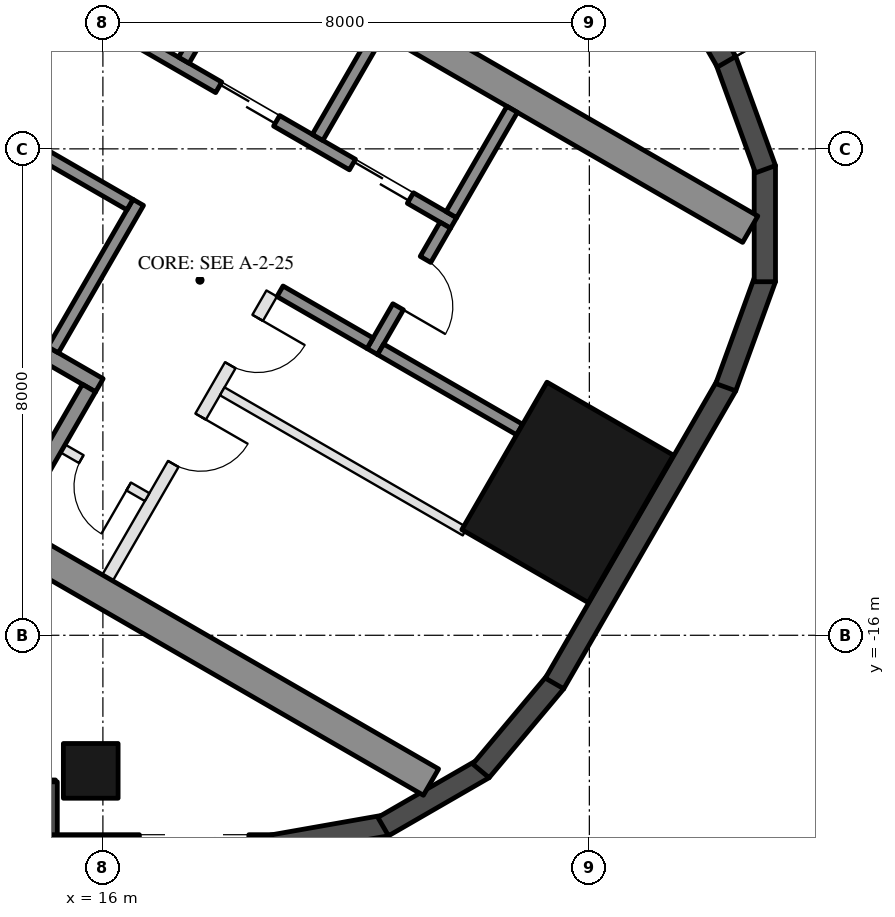
"""IFC4 building model, lengths in metres.
Left out: names, types, materials, properties, quantities, classifications, styles, units other than length and angle.
Written with IfcOpenShell. Run it as: python <this file> out.ifc"""

import sys

from ifc_helpers import new_model, si_unit, direction, frame, frame_2d, origin, origin_2d, place, context, subcontext, project, spatial, rectangle, hollow_rectangle, extrude, element, fill, save


model = new_model("IFC4")
c1 = context("Model", 3, precision=1e-05, world=origin(), true_north=direction((0.0, 1.0)))
c2 = subcontext(c1, "Body", "Model", "MODEL_VIEW")
j1 = project(units=[si_unit("LENGTHUNIT", "METRE"), si_unit("PLANEANGLEUNIT", "RADIAN")], contexts=[c1])
p1 = place(None, origin())
s1 = spatial("IfcSite", under=j1, at=p1, CompositionType="ELEMENT")
p2 = place(p1, origin())
s2 = spatial("IfcBuilding", under=s1, at=p2, CompositionType="ELEMENT")
p3 = place(p2, frame((0.0, 0.0, 113.1)))
s3 = spatial("IfcBuildingStorey", under=s2, at=p3, CompositionType="ELEMENT", Elevation=113.1)
p4 = place(p3, frame((15.8, -18.23, 0.0), z_axis=(0.0, 0.0, 1.0), x_axis=(-1.0, 0.0, 0.0)))
e1 = element("IfcColumn", 1, at=p4, inside=s3, PredefinedType="COLUMN", context=c2, shape_type="SweptSolid", body=[
    extrude(hollow_rectangle(XDim=0.9, YDim=0.9, WallThickness=0.04, at=origin_2d()), origin(), (0.0, 0.0, 1.0), 3.7),
])
p5 = place(p3, frame((23.643, -13.65, 0.0), z_axis=(0.0, 0.0, 1.0), x_axis=(0.5, 0.866025403784, 0.0)))
e2 = element("IfcColumn", 2, at=p5, inside=s3, PredefinedType="COLUMN", context=c2, shape_type="SweptSolid", body=[
    extrude(hollow_rectangle(XDim=2.8, YDim=2.4, WallThickness=0.07, at=origin_2d()), origin(), (0.0, 0.0, 1.0), 3.7),
])
p6 = place(p3, frame((8.48, -18.555, 0.0), z_axis=(0.0, 0.0, 1.0), x_axis=(1.0, 0.0, 0.0)))
e3 = element("IfcWall", 3, at=p6, inside=s3, PredefinedType="SOLIDWALL", context=c2, shape_type="SweptSolid", body=[
    extrude(rectangle(XDim=6.74, YDim=0.35, at=frame_2d((3.37, 0.0))), origin(), (0.0, 0.0, 1.0), 3.55),
])
p7 = place(p6, frame((0.32, 0.0, 0.0)))
e4 = element("IfcOpeningElement", 4, at=p7, cuts=e3, PredefinedType="OPENING", context=c2, shape_type="SweptSolid", body=[
    extrude(rectangle(XDim=2.4, YDim=2.4, at=frame_2d((1.2, 1.2))), frame((0.0, 0.185, 0.0), z_axis=(0.0, -1.0, 0.0), x_axis=(1.0, 0.0, 0.0)), (0.0, 0.0, 1.0), 0.37),
])
p8 = place(p6, frame((3.02, 0.0, 0.3)))
e5 = element("IfcOpeningElement", 5, at=p8, cuts=e3, PredefinedType="OPENING", context=c2, shape_type="SweptSolid", body=[
    extrude(rectangle(XDim=2.9, YDim=2.65, at=frame_2d((1.45, 1.325))), frame((0.0, 0.185, 0.0), z_axis=(0.0, -1.0, 0.0), x_axis=(1.0, 0.0, 0.0)), (0.0, 0.0, 1.0), 0.37),
])
p9 = place(p3, frame((15.075, -18.41, 0.0), z_axis=(0.0, 0.0, 1.0), x_axis=(0.0, -1.0, 0.0)))
e6 = element("IfcWall", 6, at=p9, inside=s3, PredefinedType="SOLIDWALL", context=c2, shape_type="SweptSolid", body=[
    extrude(rectangle(XDim=1.22, YDim=0.35, at=frame_2d((0.61, 0.0))), origin(), (0.0, 0.0, 1.0), 3.55),
])
p10 = place(p3, frame((14.9, -19.455, 0.0), z_axis=(0.0, 0.0, 1.0), x_axis=(1.0, 0.0, 0.0)))
e7 = element("IfcWall", 7, at=p10, inside=s3, PredefinedType="SOLIDWALL", context=c2, shape_type="SweptSolid", body=[
    extrude(rectangle(XDim=3.916, YDim=0.35, at=frame_2d((1.958, 0.0))), origin(), (0.0, 0.0, 1.0), 3.55),
])
p11 = place(p10, frame((1.7, 0.0, 0.3)))
e8 = element("IfcOpeningElement", 8, at=p11, cuts=e7, PredefinedType="OPENING", context=c2, shape_type="SweptSolid", body=[
    extrude(rectangle(XDim=1.8, YDim=2.65, at=frame_2d((0.9, 1.325))), frame((0.0, 0.185, 0.0), z_axis=(0.0, -1.0, 0.0), x_axis=(1.0, 0.0, 0.0)), (0.0, 0.0, 1.0), 0.37),
])
p12 = place(p3, frame((18.785, -19.458, 0.0), z_axis=(0.0, 0.0, 1.0), x_axis=(0.984798995425, 0.173697837091, 0.0)))
e9 = element("IfcWall", 9, at=p12, inside=s3, PredefinedType="SOLIDWALL", context=c2, shape_type="SweptSolid", body=[
    extrude(rectangle(XDim=1.91, YDim=0.35, at=frame_2d((0.955, 0.0))), origin(), (0.0, 0.0, 1.0), 3.55),
])
for number, where, z_axis, x_axis in (
    (10, (20.61, -19.147, 0.0), (0.0, 0.0, 1.0), (0.866, 0.5, 0.0)),
    (11, (22.217, -18.231, 0.0), (0.0, 0.0, 1.0), (0.643, 0.766, 0.0)),
):
    element("IfcWall", number, at=place(p3, frame(where, z_axis=z_axis, x_axis=x_axis)), inside=s3, PredefinedType="SOLIDWALL", context=c2, shape_type="SweptSolid", body=[
        extrude(rectangle(XDim=1.91, YDim=0.35, at=frame_2d((0.955, 0.0))), origin(), (0.0, 0.0, 1.0), 3.55),
    ])
p13 = place(p3, frame((23.427, -16.792, 0.0), z_axis=(0.0, 0.0, 1.0), x_axis=(0.500018773155, 0.866014564827, 0.0)))
e12 = element("IfcWall", 12, at=p13, inside=s3, PredefinedType="SOLIDWALL", context=c2, shape_type="SweptSolid", body=[
    extrude(rectangle(XDim=5.658, YDim=0.35, at=frame_2d((2.829, 0.0))), origin(), (0.0, 0.0, 1.0), 3.55),
])
for number, where, z_axis, x_axis in (
    (13, (26.244, -11.92, 0.0), (0.0, 0.0, 1.0), (0.342, 0.94, 0.0)),
    (14, (26.886, -10.185, 0.0), (0.0, 0.0, 1.0), (0.0, 1.0, 0.0)),
    (15, (26.897, -8.335, 0.0), (0.0, 0.0, 1.0), (-0.342, 0.94, 0.0)),
):
    element("IfcWall", number, at=place(p3, frame(where, z_axis=z_axis, x_axis=x_axis)), inside=s3, PredefinedType="SOLIDWALL", context=c2, shape_type="SweptSolid", body=[
        extrude(rectangle(XDim=1.91, YDim=0.35, at=frame_2d((0.955, 0.0))), origin(), (0.0, 0.0, 1.0), 3.55),
    ])
p14 = place(p3, frame((26.257, -6.567, 0.0), z_axis=(0.0, 0.0, 1.0), x_axis=(-0.500023526245, 0.866011820475, 0.0)))
e16 = element("IfcWall", 16, at=p14, inside=s3, PredefinedType="SOLIDWALL", context=c2, shape_type="SweptSolid", body=[
    extrude(rectangle(XDim=11.816, YDim=0.35, at=frame_2d((5.908, 0.0))), origin(), (0.0, 0.0, 1.0), 3.55),
])
p15 = place(p14, frame((0.38, 0.0, 0.3)))
e17 = element("IfcOpeningElement", 17, at=p15, cuts=e16, PredefinedType="OPENING", context=c2, shape_type="SweptSolid", body=[
    extrude(rectangle(XDim=1.8, YDim=2.65, at=frame_2d((0.9, 1.325))), frame((0.0, 0.185, 0.0), z_axis=(0.0, -1.0, 0.0), x_axis=(1.0, 0.0, 0.0)), (0.0, 0.0, 1.0), 0.37),
])
p16 = place(p14, frame((7.716, 0.0, 0.0)))
e18 = element("IfcOpeningElement", 18, at=p16, cuts=e16, PredefinedType="OPENING", context=c2, shape_type="SweptSolid", body=[
    extrude(rectangle(XDim=2.4, YDim=2.4, at=frame_2d((1.2, 1.2))), frame((0.0, 0.185, 0.0), z_axis=(0.0, -1.0, 0.0), x_axis=(1.0, 0.0, 0.0)), (0.0, 0.0, 1.0), 0.37),
])
p17 = place(p14, frame((3.816, 0.0, 0.3)))
e19 = element("IfcOpeningElement", 19, at=p17, cuts=e16, PredefinedType="OPENING", context=c2, shape_type="SweptSolid", body=[
    extrude(rectangle(XDim=1.6, YDim=2.65, at=frame_2d((0.8, 1.325))), frame((0.0, 0.185, 0.0), z_axis=(0.0, -1.0, 0.0), x_axis=(1.0, 0.0, 0.0)), (0.0, 0.0, 1.0), 0.37),
])
p18 = place(p14, frame((5.716, 0.0, 0.3)))
e20 = element("IfcOpeningElement", 20, at=p18, cuts=e16, PredefinedType="OPENING", context=c2, shape_type="SweptSolid", body=[
    extrude(rectangle(XDim=1.6, YDim=2.65, at=frame_2d((0.8, 1.325))), frame((0.0, 0.185, 0.0), z_axis=(0.0, -1.0, 0.0), x_axis=(1.0, 0.0, 0.0)), (0.0, 0.0, 1.0), 0.37),
])
for number, where, z_axis, x_axis in (
    (21, (8.547, -10.997, 0.0), (0.0, 0.0, 1.0), (0.866, -0.5, 0.0)),
    (22, (13.797, -1.903, 0.0), (0.0, 0.0, 1.0), (0.866, -0.5, 0.0)),
):
    element("IfcWall", number, at=place(p3, frame(where, z_axis=z_axis, x_axis=x_axis)), inside=s3, PredefinedType="SHEAR", context=c2, shape_type="SweptSolid", body=[
        extrude(rectangle(XDim=14.837, YDim=0.5, at=frame_2d((7.418, 0.0))), origin(), (0.0, 0.0, 1.0), 3.5),
    ])
p19 = place(p3, frame((10.356, -8.664, 0.0), z_axis=(0.0, 0.0, 1.0), x_axis=(0.866028629588, -0.499994412703, 0.0)))
e23 = element("IfcWall", 23, at=p19, inside=s3, PredefinedType="SHEAR", context=c2, shape_type="SweptSolid", body=[
    extrude(rectangle(XDim=6.45, YDim=0.25, at=frame_2d((3.225, 0.0))), origin(), (0.0, 0.0, 1.0), 3.5),
])
p20 = place(p19, frame((0.3, 0.0, 0.0)))
e24 = element("IfcOpeningElement", 24, at=p20, cuts=e23, PredefinedType="OPENING", context=c2, shape_type="SweptSolid", body=[
    extrude(rectangle(XDim=1.0, YDim=2.1, at=frame_2d((0.5, 1.05))), frame((0.0, 0.135, 0.0), z_axis=(0.0, -1.0, 0.0), x_axis=(1.0, 0.0, 0.0)), (0.0, 0.0, 1.0), 0.27),
])
p21 = place(p3, frame((14.496, -14.143, 0.0), z_axis=(0.0, 0.0, 1.0), x_axis=(0.500062241894, 0.865989465428, 0.0)))
e25 = element("IfcWall", 25, at=p21, inside=s3, PredefinedType="SHEAR", context=c2, shape_type="SweptSolid", body=[
    extrude(rectangle(XDim=2.55, YDim=0.25, at=frame_2d((1.275, 0.0))), origin(), (0.0, 0.0, 1.0), 3.5),
])
p22 = place(p3, frame((15.181, -11.305, 0.0), z_axis=(0.0, 0.0, 1.0), x_axis=(0.49994636267, 0.866056369097, 0.0)))
e26 = element("IfcWall", 26, at=p22, inside=s3, PredefinedType="SHEAR", context=c2, shape_type="SweptSolid", body=[
    extrude(rectangle(XDim=2.8, YDim=0.2, at=frame_2d((1.4, 0.0))), origin(), (0.0, 0.0, 1.0), 3.5),
])
p23 = place(p3, frame((14.02, -7.517, 0.0), z_axis=(0.0, 0.0, 1.0), x_axis=(0.866034573852, -0.49998411664, 0.0)))
e27 = element("IfcWall", 27, at=p23, inside=s3, PredefinedType="SHEAR", context=c2, shape_type="SweptSolid", body=[
    extrude(rectangle(XDim=2.8, YDim=0.2, at=frame_2d((1.4, 0.0))), origin(), (0.0, 0.0, 1.0), 3.5),
])
p24 = place(p3, frame((12.968, -4.138, 0.0), z_axis=(0.0, 0.0, 1.0), x_axis=(0.866028328073, -0.49999493495, 0.0)))
e28 = element("IfcWall", 28, at=p24, inside=s3, PredefinedType="SHEAR", context=c2, shape_type="SweptSolid", body=[
    extrude(rectangle(XDim=10.16, YDim=0.2, at=frame_2d((5.08, 0.0))), origin(), (0.0, 0.0, 1.0), 3.5),
])
p25 = place(p24, frame((0.62, 0.0, 0.0)))
e29 = element("IfcOpeningElement", 29, at=p25, cuts=e28, PredefinedType="OPENING", context=c2, shape_type="SweptSolid", body=[
    extrude(rectangle(XDim=1.1, YDim=2.1, at=frame_2d((0.55, 1.05))), frame((0.0, 0.11, 0.0), z_axis=(0.0, -1.0, 0.0), x_axis=(1.0, 0.0, 0.0)), (0.0, 0.0, 1.0), 0.22),
])
p26 = place(p24, frame((3.16, 0.0, 0.0)))
e30 = element("IfcOpeningElement", 30, at=p26, cuts=e28, PredefinedType="OPENING", context=c2, shape_type="SweptSolid", body=[
    extrude(rectangle(XDim=1.1, YDim=2.1, at=frame_2d((0.55, 1.05))), frame((0.0, 0.11, 0.0), z_axis=(0.0, -1.0, 0.0), x_axis=(1.0, 0.0, 0.0)), (0.0, 0.0, 1.0), 0.22),
])
p27 = place(p24, frame((5.7, 0.0, 0.0)))
e31 = element("IfcOpeningElement", 31, at=p27, cuts=e28, PredefinedType="OPENING", context=c2, shape_type="SweptSolid", body=[
    extrude(rectangle(XDim=1.1, YDim=2.1, at=frame_2d((0.55, 1.05))), frame((0.0, 0.11, 0.0), z_axis=(0.0, -1.0, 0.0), x_axis=(1.0, 0.0, 0.0)), (0.0, 0.0, 1.0), 0.22),
])
p28 = place(p24, frame((8.24, 0.0, 0.0)))
e32 = element("IfcOpeningElement", 32, at=p28, cuts=e28, PredefinedType="OPENING", context=c2, shape_type="SweptSolid", body=[
    extrude(rectangle(XDim=1.1, YDim=2.1, at=frame_2d((0.55, 1.05))), frame((0.0, 0.11, 0.0), z_axis=(0.0, -1.0, 0.0), x_axis=(1.0, 0.0, 0.0)), (0.0, 0.0, 1.0), 0.22),
])
p29 = place(p3, frame((20.43, -11.333, 0.0), z_axis=(0.0, 0.0, 1.0), x_axis=(0.500001309137, 0.866024647952, 0.0)))
e33 = element("IfcWall", 33, at=p29, inside=s3, PredefinedType="SHEAR", context=c2, shape_type="SweptSolid", body=[
    extrude(rectangle(XDim=2.4, YDim=0.2, at=frame_2d((1.2, 0.0))), origin(), (0.0, 0.0, 1.0), 3.5),
])
p30 = place(p29, frame((0.85, 0.0, 0.0)))
e34 = element("IfcOpeningElement", 34, at=p30, cuts=e33, PredefinedType="OPENING", context=c2, shape_type="SweptSolid", body=[
    extrude(rectangle(XDim=0.9, YDim=2.1, at=frame_2d((0.45, 1.05))), frame((0.0, 0.11, 0.0), z_axis=(0.0, -1.0, 0.0), x_axis=(1.0, 0.0, 0.0)), (0.0, 0.0, 1.0), 0.22),
])
p31 = place(p3, frame((18.913, -10.342, 0.0), z_axis=(0.0, 0.0, 1.0), x_axis=(0.866038183914, -0.499977863513, 0.0)))
e35 = element("IfcWall", 35, at=p31, inside=s3, PredefinedType="SHEAR", context=c2, shape_type="SweptSolid", body=[
    extrude(rectangle(XDim=1.71, YDim=0.2, at=frame_2d((0.855, 0.0))), origin(), (0.0, 0.0, 1.0), 3.5),
])
for number, where, z_axis, x_axis in (
    (36, (17.331, -6.542, 0.0), (0.0, 0.0, 1.0), (0.5, 0.866, 0.0)),
    (37, (19.531, -7.812, 0.0), (0.0, 0.0, 1.0), (0.5, 0.866, 0.0)),
    (38, (21.73, -9.082, 0.0), (0.0, 0.0, 1.0), (0.5, 0.866, 0.0)),
):
    element("IfcWall", number, at=place(p3, frame(where, z_axis=z_axis, x_axis=x_axis)), inside=s3, PredefinedType="SHEAR", context=c2, shape_type="SweptSolid", body=[
        extrude(rectangle(XDim=2.0, YDim=0.2, at=frame_2d((1.0, 0.0))), origin(), (0.0, 0.0, 1.0), 3.5),
    ])
p32 = place(p3, frame((20.567, -11.297, 0.0), z_axis=(0.0, 0.0, 1.0), x_axis=(0.866060851709, -0.499938597367, 0.0)))
e39 = element("IfcWall", 39, at=p32, inside=s3, PredefinedType="SHEAR", context=c2, shape_type="SweptSolid", body=[
    extrude(rectangle(XDim=2.64, YDim=0.2, at=frame_2d((1.32, 0.0))), origin(), (0.0, 0.0, 1.0), 3.5),
])
p33 = place(p3, frame((16.076, -15.055, 0.0), z_axis=(0.0, 0.0, 1.0), x_axis=(0.499995103361, 0.866028230842, 0.0)))
e40 = element("IfcWall", 40, at=p33, inside=s3, PredefinedType="PARTITIONING", context=c2, shape_type="SweptSolid", body=[
    extrude(rectangle(XDim=5.4, YDim=0.2, at=frame_2d((2.7, 0.0))), origin(), (0.0, 0.0, 1.0), 3.5),
])
p34 = place(p33, frame((2.163, 0.0, 0.0)))
e41 = element("IfcOpeningElement", 41, at=p34, cuts=e40, PredefinedType="OPENING", context=c2, shape_type="SweptSolid", body=[
    extrude(rectangle(XDim=0.9, YDim=2.1, at=frame_2d((0.45, 1.05))), frame((0.0, 0.11, 0.0), z_axis=(0.0, -1.0, 0.0), x_axis=(1.0, 0.0, 0.0)), (0.0, 0.0, 1.0), 0.22),
])
p35 = place(p33, frame((4.038, 0.0, 0.0)))
e42 = element("IfcOpeningElement", 42, at=p35, cuts=e40, PredefinedType="OPENING", context=c2, shape_type="SweptSolid", body=[
    extrude(rectangle(XDim=0.9, YDim=2.1, at=frame_2d((0.45, 1.05))), frame((0.0, 0.11, 0.0), z_axis=(0.0, -1.0, 0.0), x_axis=(1.0, 0.0, 0.0)), (0.0, 0.0, 1.0), 0.22),
])
p36 = place(p3, frame((15.342, -12.928, 0.0), z_axis=(0.0, 0.0, 1.0), x_axis=(0.865989903783, -0.500061482766, 0.0)))
e43 = element("IfcWall", 43, at=p36, inside=s3, PredefinedType="PARTITIONING", context=c2, shape_type="SweptSolid", body=[
    extrude(rectangle(XDim=1.6, YDim=0.15, at=frame_2d((0.8, 0.0))), origin(), (0.0, 0.0, 1.0), 3.5),
])
p37 = place(p36, frame((0.35, 0.0, 0.0)))
e44 = element("IfcOpeningElement", 44, at=p37, cuts=e43, PredefinedType="OPENING", context=c2, shape_type="SweptSolid", body=[
    extrude(rectangle(XDim=0.9, YDim=2.1, at=frame_2d((0.45, 1.05))), frame((0.0, 0.085, 0.0), z_axis=(0.0, -1.0, 0.0), x_axis=(1.0, 0.0, 0.0)), (0.0, 0.0, 1.0), 0.17),
])
p38 = place(p3, frame((17.963, -11.987, 0.0), z_axis=(0.0, 0.0, 1.0), x_axis=(0.865998608524, -0.500046407882, 0.0)))
e45 = element("IfcWall", 45, at=p38, inside=s3, PredefinedType="PARTITIONING", context=c2, shape_type="SweptSolid", body=[
    extrude(rectangle(XDim=4.61, YDim=0.15, at=frame_2d((2.305, 0.0))), origin(), (0.0, 0.0, 1.0), 3.5),
])
p39 = place(p37, frame((0.9, 0.0, 0.0), z_axis=(0.0, 0.0, 1.0), x_axis=(-1.0, 0.0, 0.0)))
e46 = element("IfcDoor", 46, at=p39, inside=s3, OperationType="SINGLE_SWING_LEFT", PredefinedType="DOOR", context=c2, shape_type="SweptSolid", body=[
    extrude(rectangle(XDim=0.9, YDim=2.1, at=frame_2d((0.45, 1.05))), frame((0.0, 0.025, 0.0), z_axis=(0.0, -1.0, 0.0), x_axis=(1.0, 0.0, 0.0)), (0.0, 0.0, 1.0), 0.05),
])
fill(e44, e46)
p40 = place(p27, origin())
e47 = element("IfcDoor", 47, at=p40, inside=s3, OperationType="DOUBLE_DOOR_SLIDING", PredefinedType="DOOR", context=c2, shape_type="SweptSolid", body=[
    extrude(rectangle(XDim=1.1, YDim=2.1, at=frame_2d((0.55, 1.05))), frame((0.0, 0.025, 0.0), z_axis=(0.0, -1.0, 0.0), x_axis=(1.0, 0.0, 0.0)), (0.0, 0.0, 1.0), 0.05),
])
fill(e31, e47)
p41 = place(p28, origin())
e48 = element("IfcDoor", 48, at=p41, inside=s3, OperationType="DOUBLE_DOOR_SLIDING", PredefinedType="DOOR", context=c2, shape_type="SweptSolid", body=[
    extrude(rectangle(XDim=1.1, YDim=2.1, at=frame_2d((0.55, 1.05))), frame((0.0, 0.025, 0.0), z_axis=(0.0, -1.0, 0.0), x_axis=(1.0, 0.0, 0.0)), (0.0, 0.0, 1.0), 0.05),
])
fill(e32, e48)
p42 = place(p30, frame((0.9, 0.0, 0.0), z_axis=(0.0, 0.0, 1.0), x_axis=(-1.0, 0.0, 0.0)))
e49 = element("IfcDoor", 49, at=p42, inside=s3, OperationType="SINGLE_SWING_RIGHT", PredefinedType="DOOR", context=c2, shape_type="SweptSolid", body=[
    extrude(rectangle(XDim=0.9, YDim=2.1, at=frame_2d((0.45, 1.05))), frame((0.0, 0.025, 0.0), z_axis=(0.0, -1.0, 0.0), x_axis=(1.0, 0.0, 0.0)), (0.0, 0.0, 1.0), 0.05),
])
fill(e34, e49)
p43 = place(p34, frame((0.9, 0.0, 0.0), z_axis=(0.0, 0.0, 1.0), x_axis=(-1.0, 0.0, 0.0)))
e50 = element("IfcDoor", 50, at=p43, inside=s3, OperationType="SINGLE_SWING_LEFT", PredefinedType="DOOR", context=c2, shape_type="SweptSolid", body=[
    extrude(rectangle(XDim=0.9, YDim=2.1, at=frame_2d((0.45, 1.05))), frame((0.0, 0.025, 0.0), z_axis=(0.0, -1.0, 0.0), x_axis=(1.0, 0.0, 0.0)), (0.0, 0.0, 1.0), 0.05),
])
fill(e41, e50)
p44 = place(p35, frame((0.9, 0.0, 0.0), z_axis=(0.0, 0.0, 1.0), x_axis=(-1.0, 0.0, 0.0)))
e51 = element("IfcDoor", 51, at=p44, inside=s3, OperationType="SINGLE_SWING_LEFT", PredefinedType="DOOR", context=c2, shape_type="SweptSolid", body=[
    extrude(rectangle(XDim=0.9, YDim=2.1, at=frame_2d((0.45, 1.05))), frame((0.0, 0.025, 0.0), z_axis=(0.0, -1.0, 0.0), x_axis=(1.0, 0.0, 0.0)), (0.0, 0.0, 1.0), 0.05),
])
fill(e42, e51)
save(model, sys.argv[1])
